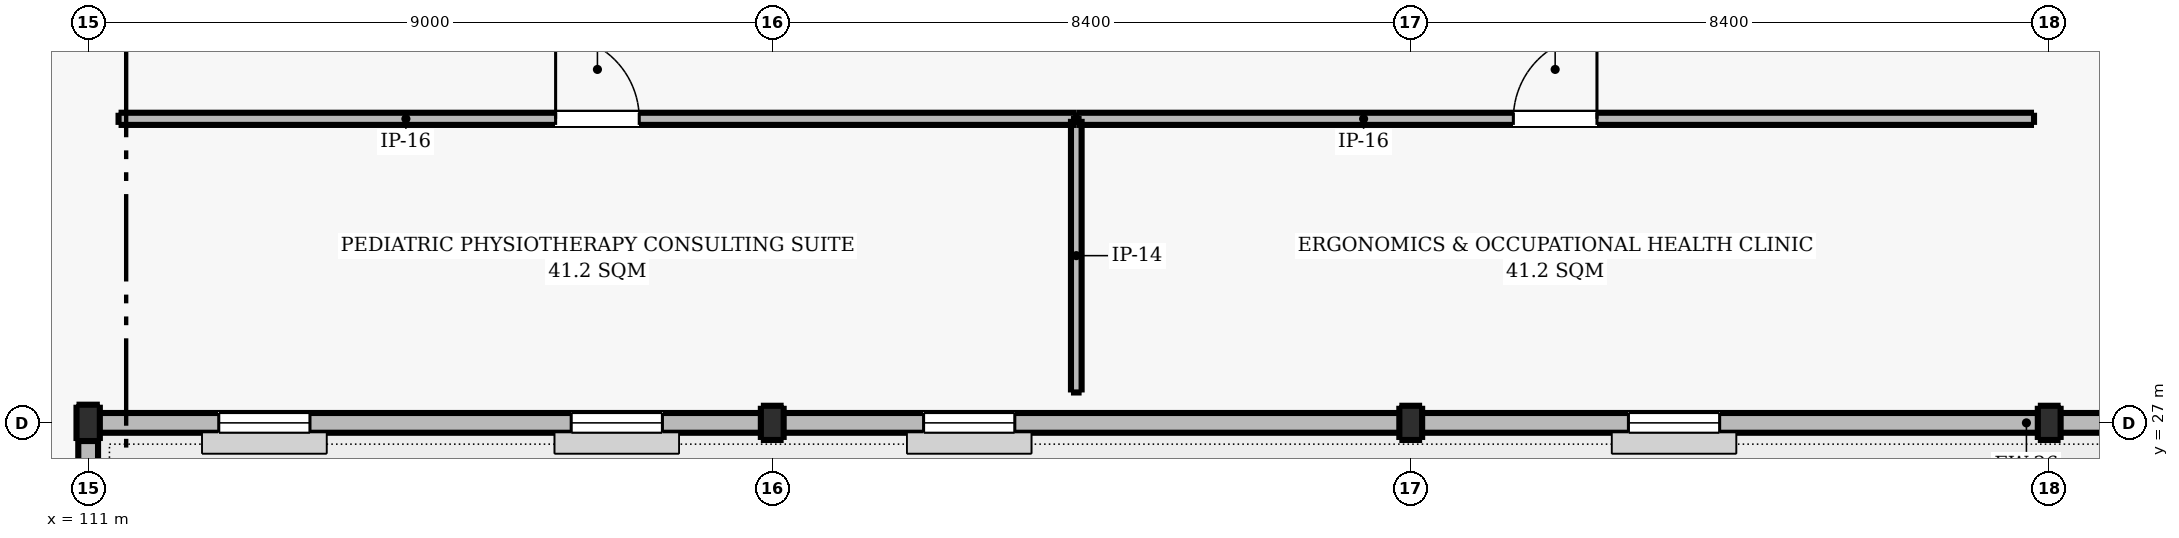
"""IFC4 building model, lengths in metres.
Left out: names, types, materials, properties, quantities, classifications, styles, units other than length and angle.
Written with IfcOpenShell. Run it as: python <this file> out.ifc"""

import sys

from ifc_helpers import new_model, si_unit, direction, frame, frame_2d, origin, origin_2d, place, context, subcontext, project, spatial, rectangle, i_section, extrude, element, fill, save


model = new_model("IFC4")
c1 = context("Model", 3, precision=1e-05, world=origin(), true_north=direction((0.0, 1.0)))
c2 = subcontext(c1, "Body", "Model", "MODEL_VIEW")
j1 = project(units=[si_unit("LENGTHUNIT", "METRE"), si_unit("PLANEANGLEUNIT", "RADIAN")], contexts=[c1])
p1 = place(None, origin())
s1 = spatial("IfcSite", under=j1, at=p1, CompositionType="ELEMENT")
p2 = place(p1, origin())
s2 = spatial("IfcBuilding", under=s1, at=p2, CompositionType="ELEMENT")
p3 = place(p2, frame((0.0, 0.0, 5.1)))
s3 = spatial("IfcBuildingStorey", under=s2, at=p3, CompositionType="ELEMENT", Elevation=5.1)
p4 = place(p3, frame((111.0, 27.0, 0.0), z_axis=(0.0, 0.0, 1.0), x_axis=(1.0, 0.0, 0.0)))
e1 = element("IfcColumn", 1, at=p4, inside=s3, PredefinedType="COLUMN", context=c2, shape_type="SweptSolid", body=[
    extrude(i_section(OverallWidth=0.307, OverallDepth=0.478, WebThickness=0.021, FlangeThickness=0.04, FilletRadius=0.027, at=origin_2d()), origin(), (0.0, 0.0, 1.0), 4.5),
])
for number, where, z_axis, x_axis in (
    (2, (120.0, 27.0, 0.0), (0.0, 0.0, 1.0), (1.0, 0.0, 0.0)),
    (3, (128.4, 27.0, 0.0), (0.0, 0.0, 1.0), (1.0, 0.0, 0.0)),
    (4, (136.8, 27.0, 0.0), (0.0, 0.0, 1.0), (1.0, 0.0, 0.0)),
):
    element("IfcColumn", number, at=place(p3, frame(where, z_axis=z_axis, x_axis=x_axis)), inside=s3, PredefinedType="COLUMN", context=c2, shape_type="SweptSolid", body=[
        extrude(i_section(OverallWidth=0.3, OverallDepth=0.45, WebThickness=0.014, FlangeThickness=0.026, FilletRadius=0.027, at=origin_2d()), origin(), (0.0, 0.0, 1.0), 4.5),
    ])
p5 = place(p3, frame((162.0, 27.0, 0.0), z_axis=(0.0, 0.0, 1.0), x_axis=(-1.0, 0.0, 0.0)))
e5 = element("IfcWall", 5, at=p5, inside=s3, PredefinedType="SOLIDWALL", context=c2, shape_type="SweptSolid", body=[
    extrude(rectangle(XDim=51.0, YDim=0.26, at=frame_2d((25.5, 0.0))), origin(), (0.0, 0.0, 1.0), 3.26),
])
p6 = place(p5, frame((1.718, 0.0, 1.03)))
e6 = element("IfcOpeningElement", 6, at=p6, cuts=e5, PredefinedType="OPENING", context=c2, shape_type="SweptSolid", body=[
    extrude(rectangle(XDim=1.2, YDim=1.2, at=frame_2d((0.6, 0.6))), frame((0.0, 0.14, 0.0), z_axis=(0.0, -1.0, 0.0), x_axis=(1.0, 0.0, 0.0)), (0.0, 0.0, 1.0), 0.28),
])
p7 = place(p5, frame((6.355, 0.0, 1.03)))
e7 = element("IfcOpeningElement", 7, at=p7, cuts=e5, PredefinedType="OPENING", context=c2, shape_type="SweptSolid", body=[
    extrude(rectangle(XDim=1.2, YDim=1.2, at=frame_2d((0.6, 0.6))), frame((0.0, 0.14, 0.0), z_axis=(0.0, -1.0, 0.0), x_axis=(1.0, 0.0, 0.0)), (0.0, 0.0, 1.0), 0.28),
])
p8 = place(p5, frame((20.264, 0.0, 1.03)))
e8 = element("IfcOpeningElement", 8, at=p8, cuts=e5, PredefinedType="OPENING", context=c2, shape_type="SweptSolid", body=[
    extrude(rectangle(XDim=1.2, YDim=1.2, at=frame_2d((0.6, 0.6))), frame((0.0, 0.14, 0.0), z_axis=(0.0, -1.0, 0.0), x_axis=(1.0, 0.0, 0.0)), (0.0, 0.0, 1.0), 0.28),
])
p9 = place(p5, frame((29.536, 0.0, 1.03)))
e9 = element("IfcOpeningElement", 9, at=p9, cuts=e5, PredefinedType="OPENING", context=c2, shape_type="SweptSolid", body=[
    extrude(rectangle(XDim=1.2, YDim=1.2, at=frame_2d((0.6, 0.6))), frame((0.0, 0.14, 0.0), z_axis=(0.0, -1.0, 0.0), x_axis=(1.0, 0.0, 0.0)), (0.0, 0.0, 1.0), 0.28),
])
p10 = place(p5, frame((38.809, 0.0, 1.03)))
e10 = element("IfcOpeningElement", 10, at=p10, cuts=e5, PredefinedType="OPENING", context=c2, shape_type="SweptSolid", body=[
    extrude(rectangle(XDim=1.2, YDim=1.2, at=frame_2d((0.6, 0.6))), frame((0.0, 0.14, 0.0), z_axis=(0.0, -1.0, 0.0), x_axis=(1.0, 0.0, 0.0)), (0.0, 0.0, 1.0), 0.28),
])
p11 = place(p5, frame((43.445, 0.0, 1.03)))
e11 = element("IfcOpeningElement", 11, at=p11, cuts=e5, PredefinedType="OPENING", context=c2, shape_type="SweptSolid", body=[
    extrude(rectangle(XDim=1.2, YDim=1.2, at=frame_2d((0.6, 0.6))), frame((0.0, 0.14, 0.0), z_axis=(0.0, -1.0, 0.0), x_axis=(1.0, 0.0, 0.0)), (0.0, 0.0, 1.0), 0.28),
])
p12 = place(p5, frame((48.082, 0.0, 1.03)))
e12 = element("IfcOpeningElement", 12, at=p12, cuts=e5, PredefinedType="OPENING", context=c2, shape_type="SweptSolid", body=[
    extrude(rectangle(XDim=1.2, YDim=1.2, at=frame_2d((0.6, 0.6))), frame((0.0, 0.14, 0.0), z_axis=(0.0, -1.0, 0.0), x_axis=(1.0, 0.0, 0.0)), (0.0, 0.0, 1.0), 0.28),
])
p13 = place(p3, frame((111.0, 27.0, 0.0), z_axis=(0.0, 0.0, 1.0), x_axis=(0.0, -1.0, 0.0)))
e13 = element("IfcWall", 13, at=p13, inside=s3, PredefinedType="SOLIDWALL", context=c2, shape_type="SweptSolid", body=[
    extrude(rectangle(XDim=27.0, YDim=0.26, at=frame_2d((13.5, 0.0))), origin(), (0.0, 0.0, 1.0), 3.68),
])
p14 = place(p13, frame((5.9, 0.0, 0.95)))
e14 = element("IfcOpeningElement", 14, at=p14, cuts=e13, PredefinedType="OPENING", context=c2, shape_type="SweptSolid", body=[
    extrude(rectangle(XDim=1.7, YDim=2.0, at=frame_2d((0.85, 1.0))), frame((0.0, 0.14, 0.0), z_axis=(0.0, -1.0, 0.0), x_axis=(1.0, 0.0, 0.0)), (0.0, 0.0, 1.0), 0.28),
])
p15 = place(p13, frame((10.4, 0.0, 0.95)))
e15 = element("IfcOpeningElement", 15, at=p15, cuts=e13, PredefinedType="OPENING", context=c2, shape_type="SweptSolid", body=[
    extrude(rectangle(XDim=1.7, YDim=2.0, at=frame_2d((0.85, 1.0))), frame((0.0, 0.14, 0.0), z_axis=(0.0, -1.0, 0.0), x_axis=(1.0, 0.0, 0.0)), (0.0, 0.0, 1.0), 0.28),
])
p16 = place(p13, frame((14.9, 0.0, 0.95)))
e16 = element("IfcOpeningElement", 16, at=p16, cuts=e13, PredefinedType="OPENING", context=c2, shape_type="SweptSolid", body=[
    extrude(rectangle(XDim=1.7, YDim=2.0, at=frame_2d((0.85, 1.0))), frame((0.0, 0.14, 0.0), z_axis=(0.0, -1.0, 0.0), x_axis=(1.0, 0.0, 0.0)), (0.0, 0.0, 1.0), 0.28),
])
p17 = place(p13, frame((19.4, 0.0, 0.95)))
e17 = element("IfcOpeningElement", 17, at=p17, cuts=e13, PredefinedType="OPENING", context=c2, shape_type="SweptSolid", body=[
    extrude(rectangle(XDim=1.7, YDim=2.0, at=frame_2d((0.85, 1.0))), frame((0.0, 0.14, 0.0), z_axis=(0.0, -1.0, 0.0), x_axis=(1.0, 0.0, 0.0)), (0.0, 0.0, 1.0), 0.28),
])
p18 = place(p13, frame((23.9, 0.0, 0.95)))
e18 = element("IfcOpeningElement", 18, at=p18, cuts=e13, PredefinedType="OPENING", context=c2, shape_type="SweptSolid", body=[
    extrude(rectangle(XDim=1.7, YDim=2.0, at=frame_2d((0.85, 1.0))), frame((0.0, 0.14, 0.0), z_axis=(0.0, -1.0, 0.0), x_axis=(1.0, 0.0, 0.0)), (0.0, 0.0, 1.0), 0.28),
])
p19 = place(p3, frame((111.4, 31.0, 0.0), z_axis=(0.0, 0.0, 1.0), x_axis=(1.0, 0.0, 0.0)))
e19 = element("IfcWall", 19, at=p19, inside=s3, PredefinedType="PARTITIONING", context=c2, shape_type="SweptSolid", body=[
    extrude(rectangle(XDim=12.6, YDim=0.16, at=frame_2d((6.3, 0.0))), origin(), (0.0, 0.0, 1.0), 4.21),
])
p20 = place(p19, frame((5.75, 0.0, 0.0)))
e20 = element("IfcOpeningElement", 20, at=p20, cuts=e19, PredefinedType="OPENING", context=c2, shape_type="SweptSolid", body=[
    extrude(rectangle(XDim=1.1, YDim=2.15, at=frame_2d((0.55, 1.075))), frame((0.0, 0.09, 0.0), z_axis=(0.0, -1.0, 0.0), x_axis=(1.0, 0.0, 0.0)), (0.0, 0.0, 1.0), 0.18),
])
p21 = place(p3, frame((124.0, 27.4, 0.0), z_axis=(0.0, 0.0, 1.0), x_axis=(0.0, 1.0, 0.0)))
e21 = element("IfcWall", 21, at=p21, inside=s3, PredefinedType="PARTITIONING", context=c2, shape_type="SweptSolid", body=[
    extrude(rectangle(XDim=3.6, YDim=0.14, at=frame_2d((1.8, 0.0))), origin(), (0.0, 0.0, 1.0), 4.21),
])
p22 = place(p3, frame((124.0, 31.0, 0.0), z_axis=(0.0, 0.0, 1.0), x_axis=(1.0, 0.0, 0.0)))
e22 = element("IfcWall", 22, at=p22, inside=s3, PredefinedType="PARTITIONING", context=c2, shape_type="SweptSolid", body=[
    extrude(rectangle(XDim=12.6, YDim=0.16, at=frame_2d((6.3, 0.0))), origin(), (0.0, 0.0, 1.0), 4.21),
])
p23 = place(p22, frame((5.75, 0.0, 0.0)))
e23 = element("IfcOpeningElement", 23, at=p23, cuts=e22, PredefinedType="OPENING", context=c2, shape_type="SweptSolid", body=[
    extrude(rectangle(XDim=1.1, YDim=2.15, at=frame_2d((0.55, 1.075))), frame((0.0, 0.09, 0.0), z_axis=(0.0, -1.0, 0.0), x_axis=(1.0, 0.0, 0.0)), (0.0, 0.0, 1.0), 0.18),
])
p24 = place(p9, origin())
e24 = element("IfcWindow", 24, at=p24, inside=s3, PartitioningType="SINGLE_PANEL", PredefinedType="WINDOW", context=c2, shape_type="SweptSolid", body=[
    extrude(rectangle(XDim=1.2, YDim=1.2, at=frame_2d((0.6, 0.6))), frame((0.0, 0.03, 0.0), z_axis=(0.0, -1.0, 0.0), x_axis=(1.0, 0.0, 0.0)), (0.0, 0.0, 1.0), 0.06),
])
fill(e9, e24)
p25 = place(p10, origin())
e25 = element("IfcWindow", 25, at=p25, inside=s3, PartitioningType="SINGLE_PANEL", PredefinedType="WINDOW", context=c2, shape_type="SweptSolid", body=[
    extrude(rectangle(XDim=1.2, YDim=1.2, at=frame_2d((0.6, 0.6))), frame((0.0, 0.03, 0.0), z_axis=(0.0, -1.0, 0.0), x_axis=(1.0, 0.0, 0.0)), (0.0, 0.0, 1.0), 0.06),
])
fill(e10, e25)
p26 = place(p11, origin())
e26 = element("IfcWindow", 26, at=p26, inside=s3, PartitioningType="SINGLE_PANEL", PredefinedType="WINDOW", context=c2, shape_type="SweptSolid", body=[
    extrude(rectangle(XDim=1.2, YDim=1.2, at=frame_2d((0.6, 0.6))), frame((0.0, 0.03, 0.0), z_axis=(0.0, -1.0, 0.0), x_axis=(1.0, 0.0, 0.0)), (0.0, 0.0, 1.0), 0.06),
])
fill(e11, e26)
p27 = place(p12, origin())
e27 = element("IfcWindow", 27, at=p27, inside=s3, PartitioningType="SINGLE_PANEL", PredefinedType="WINDOW", context=c2, shape_type="SweptSolid", body=[
    extrude(rectangle(XDim=1.2, YDim=1.2, at=frame_2d((0.6, 0.6))), frame((0.0, 0.03, 0.0), z_axis=(0.0, -1.0, 0.0), x_axis=(1.0, 0.0, 0.0)), (0.0, 0.0, 1.0), 0.06),
])
fill(e12, e27)
p28 = place(p20, origin())
e28 = element("IfcDoor", 28, at=p28, inside=s3, OperationType="SINGLE_SWING_LEFT", PredefinedType="DOOR", context=c2, shape_type="SweptSolid", body=[
    extrude(rectangle(XDim=1.1, YDim=2.15, at=frame_2d((0.55, 1.075))), frame((0.0, 0.025, 0.0), z_axis=(0.0, -1.0, 0.0), x_axis=(1.0, 0.0, 0.0)), (0.0, 0.0, 1.0), 0.05),
])
fill(e20, e28)
p29 = place(p23, origin())
e29 = element("IfcDoor", 29, at=p29, inside=s3, OperationType="SINGLE_SWING_RIGHT", PredefinedType="DOOR", context=c2, shape_type="SweptSolid", body=[
    extrude(rectangle(XDim=1.1, YDim=2.15, at=frame_2d((0.55, 1.075))), frame((0.0, 0.025, 0.0), z_axis=(0.0, -1.0, 0.0), x_axis=(1.0, 0.0, 0.0)), (0.0, 0.0, 1.0), 0.05),
])
fill(e23, e29)
save(model, sys.argv[1])
